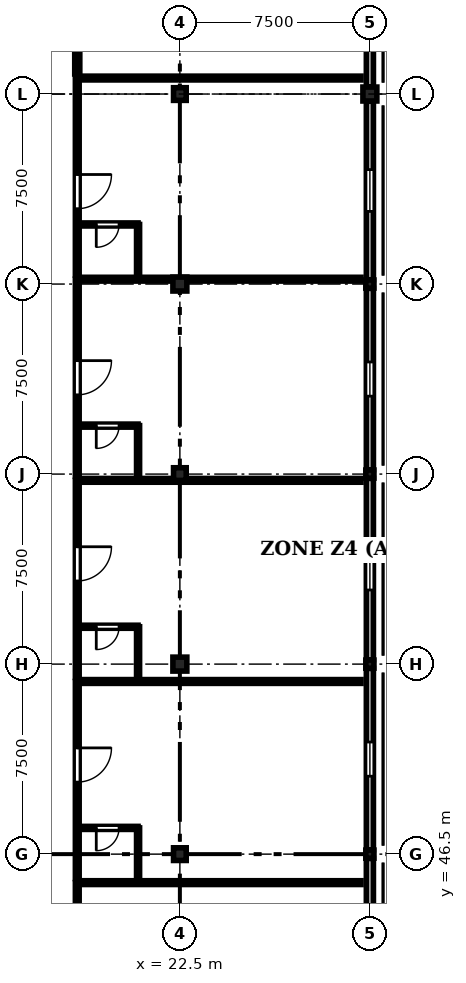
"""IFC4 building model, lengths in metres.
Left out: names, types, materials, properties, quantities, classifications, styles, units other than length and angle.
Written with IfcOpenShell. Run it as: python <this file> out.ifc"""

import sys

from ifc_helpers import new_model, si_unit, direction, frame, frame_2d, origin, origin_2d, place, context, subcontext, project, spatial, rectangle, extrude, element, fill, save


model = new_model("IFC4")
c1 = context("Model", 3, precision=1e-05, world=origin(), true_north=direction((0.0, 1.0)))
c2 = subcontext(c1, "Body", "Model", "MODEL_VIEW")
j1 = project(units=[si_unit("LENGTHUNIT", "METRE"), si_unit("PLANEANGLEUNIT", "RADIAN")], contexts=[c1])
p1 = place(None, origin())
s1 = spatial("IfcSite", under=j1, at=p1, CompositionType="ELEMENT")
p2 = place(p1, origin())
s2 = spatial("IfcBuilding", under=s1, at=p2, CompositionType="ELEMENT")
p3 = place(p2, frame((0.0, 0.0, 25.95)))
s3 = spatial("IfcBuildingStorey", under=s2, at=p3, CompositionType="ELEMENT", Elevation=25.95)
p4 = place(p3, frame((22.5, 46.5, 0.0), z_axis=(0.0, 0.0, 1.0), x_axis=(1.0, 0.0, 0.0)))
e1 = element("IfcColumn", 1, at=p4, inside=s3, PredefinedType="COLUMN", context=c2, shape_type="SweptSolid", body=[
    extrude(rectangle(XDim=0.5, YDim=0.5, at=origin_2d()), origin(), (0.0, 0.0, 1.0), 4.05),
])
p5 = place(p3, frame((22.5, 54.0, 0.0), z_axis=(0.0, 0.0, 1.0), x_axis=(1.0, 0.0, 0.0)))
e2 = element("IfcColumn", 2, at=p5, inside=s3, PredefinedType="COLUMN", context=c2, shape_type="SweptSolid", body=[
    extrude(rectangle(XDim=0.55, YDim=0.55, at=origin_2d()), origin(), (0.0, 0.0, 1.0), 4.05),
])
p6 = place(p3, frame((22.5, 61.5, 0.0), z_axis=(0.0, 0.0, 1.0), x_axis=(1.0, 0.0, 0.0)))
e3 = element("IfcColumn", 3, at=p6, inside=s3, PredefinedType="COLUMN", context=c2, shape_type="SweptSolid", body=[
    extrude(rectangle(XDim=0.5, YDim=0.5, at=origin_2d()), origin(), (0.0, 0.0, 1.0), 4.05),
])
p7 = place(p3, frame((22.5, 69.0, 0.0), z_axis=(0.0, 0.0, 1.0), x_axis=(1.0, 0.0, 0.0)))
e4 = element("IfcColumn", 4, at=p7, inside=s3, PredefinedType="COLUMN", context=c2, shape_type="SweptSolid", body=[
    extrude(rectangle(XDim=0.55, YDim=0.55, at=origin_2d()), origin(), (0.0, 0.0, 1.0), 4.05),
])
p8 = place(p3, frame((22.5, 76.5, 0.0), z_axis=(0.0, 0.0, 1.0), x_axis=(1.0, 0.0, 0.0)))
e5 = element("IfcColumn", 5, at=p8, inside=s3, PredefinedType="COLUMN", context=c2, shape_type="SweptSolid", body=[
    extrude(rectangle(XDim=0.5, YDim=0.5, at=origin_2d()), origin(), (0.0, 0.0, 1.0), 4.05),
])
for number, where, z_axis, x_axis in (
    (6, (30.0, 46.5, 0.0), (0.0, 0.0, 1.0), (1.0, 0.0, 0.0)),
    (7, (30.0, 54.0, 0.0), (0.0, 0.0, 1.0), (1.0, 0.0, 0.0)),
    (8, (30.0, 61.5, 0.0), (0.0, 0.0, 1.0), (1.0, 0.0, 0.0)),
    (9, (30.0, 69.0, 0.0), (0.0, 0.0, 1.0), (1.0, 0.0, 0.0)),
):
    element("IfcColumn", number, at=place(p3, frame(where, z_axis=z_axis, x_axis=x_axis)), inside=s3, PredefinedType="COLUMN", context=c2, shape_type="SweptSolid", body=[
        extrude(rectangle(XDim=0.32, YDim=0.32, at=origin_2d()), origin(), (0.0, 0.0, 1.0), 4.05),
    ])
p9 = place(p3, frame((30.0, 76.5, 0.0), z_axis=(0.0, 0.0, 1.0), x_axis=(1.0, 0.0, 0.0)))
e10 = element("IfcColumn", 10, at=p9, inside=s3, PredefinedType="COLUMN", context=c2, shape_type="SweptSolid", body=[
    extrude(rectangle(XDim=0.55, YDim=0.55, at=origin_2d()), origin(), (0.0, 0.0, 1.0), 4.05),
])
p10 = place(p3, frame((30.0, 46.33, 0.0), z_axis=(0.0, 0.0, 1.0), x_axis=(0.0, -1.0, 0.0)))
e11 = element("IfcWall", 11, at=p10, inside=s3, PredefinedType="STANDARD", context=c2, shape_type="SweptSolid", body=[
    extrude(rectangle(XDim=7.16, YDim=0.28, at=frame_2d((3.58, 0.0))), origin(), (0.0, 0.0, 1.0), 3.17),
])
p11 = place(p10, frame((2.755, 0.0, 0.85)))
e12 = element("IfcOpeningElement", 12, at=p11, cuts=e11, PredefinedType="OPENING", context=c2, shape_type="SweptSolid", body=[
    extrude(rectangle(XDim=1.65, YDim=2.04, at=frame_2d((0.825, 1.02))), frame((0.0, 0.15, 0.0), z_axis=(0.0, -1.0, 0.0), x_axis=(1.0, 0.0, 0.0)), (0.0, 0.0, 1.0), 0.3),
])
p12 = place(p3, frame((30.0, 53.83, 0.0), z_axis=(0.0, 0.0, 1.0), x_axis=(0.0, -1.0, 0.0)))
e13 = element("IfcWall", 13, at=p12, inside=s3, PredefinedType="STANDARD", context=c2, shape_type="SweptSolid", body=[
    extrude(rectangle(XDim=7.16, YDim=0.28, at=frame_2d((3.58, 0.0))), origin(), (0.0, 0.0, 1.0), 3.17),
])
p13 = place(p12, frame((2.905, 0.0, 0.85)))
e14 = element("IfcOpeningElement", 14, at=p13, cuts=e13, PredefinedType="OPENING", context=c2, shape_type="SweptSolid", body=[
    extrude(rectangle(XDim=1.35, YDim=2.04, at=frame_2d((0.675, 1.02))), frame((0.0, 0.15, 0.0), z_axis=(0.0, -1.0, 0.0), x_axis=(1.0, 0.0, 0.0)), (0.0, 0.0, 1.0), 0.3),
])
p14 = place(p3, frame((30.0, 61.33, 0.0), z_axis=(0.0, 0.0, 1.0), x_axis=(0.0, -1.0, 0.0)))
e15 = element("IfcWall", 15, at=p14, inside=s3, PredefinedType="STANDARD", context=c2, shape_type="SweptSolid", body=[
    extrude(rectangle(XDim=7.16, YDim=0.28, at=frame_2d((3.58, 0.0))), origin(), (0.0, 0.0, 1.0), 3.17),
])
p15 = place(p14, frame((2.755, 0.0, 0.85)))
e16 = element("IfcOpeningElement", 16, at=p15, cuts=e15, PredefinedType="OPENING", context=c2, shape_type="SweptSolid", body=[
    extrude(rectangle(XDim=1.65, YDim=2.04, at=frame_2d((0.825, 1.02))), frame((0.0, 0.15, 0.0), z_axis=(0.0, -1.0, 0.0), x_axis=(1.0, 0.0, 0.0)), (0.0, 0.0, 1.0), 0.3),
])
p16 = place(p3, frame((30.0, 68.83, 0.0), z_axis=(0.0, 0.0, 1.0), x_axis=(0.0, -1.0, 0.0)))
e17 = element("IfcWall", 17, at=p16, inside=s3, PredefinedType="STANDARD", context=c2, shape_type="SweptSolid", body=[
    extrude(rectangle(XDim=7.16, YDim=0.28, at=frame_2d((3.58, 0.0))), origin(), (0.0, 0.0, 1.0), 3.17),
])
p17 = place(p16, frame((2.905, 0.0, 0.85)))
e18 = element("IfcOpeningElement", 18, at=p17, cuts=e17, PredefinedType="OPENING", context=c2, shape_type="SweptSolid", body=[
    extrude(rectangle(XDim=1.35, YDim=2.04, at=frame_2d((0.675, 1.02))), frame((0.0, 0.15, 0.0), z_axis=(0.0, -1.0, 0.0), x_axis=(1.0, 0.0, 0.0)), (0.0, 0.0, 1.0), 0.3),
])
p18 = place(p3, frame((30.0, 76.215, 0.0), z_axis=(0.0, 0.0, 1.0), x_axis=(0.0, -1.0, 0.0)))
e19 = element("IfcWall", 19, at=p18, inside=s3, PredefinedType="STANDARD", context=c2, shape_type="SweptSolid", body=[
    extrude(rectangle(XDim=7.045, YDim=0.28, at=frame_2d((3.522, 0.0))), origin(), (0.0, 0.0, 1.0), 3.17),
])
p19 = place(p18, frame((2.698, 0.0, 0.85)))
e20 = element("IfcOpeningElement", 20, at=p19, cuts=e19, PredefinedType="OPENING", context=c2, shape_type="SweptSolid", body=[
    extrude(rectangle(XDim=1.65, YDim=2.04, at=frame_2d((0.825, 1.02))), frame((0.0, 0.15, 0.0), z_axis=(0.0, -1.0, 0.0), x_axis=(1.0, 0.0, 0.0)), (0.0, 0.0, 1.0), 0.3),
])
p20 = place(p3, frame((30.0, 85.265, 0.0), z_axis=(0.0, 0.0, 1.0), x_axis=(0.0, -1.0, 0.0)))
e21 = element("IfcWall", 21, at=p20, inside=s3, PredefinedType="STANDARD", context=c2, shape_type="SweptSolid", body=[
    extrude(rectangle(XDim=8.48, YDim=0.28, at=frame_2d((4.24, 0.0))), origin(), (0.0, 0.0, 1.0), 3.22),
])
p21 = place(p20, frame((3.565, 0.0, 0.85)))
e22 = element("IfcOpeningElement", 22, at=p21, cuts=e21, PredefinedType="OPENING", context=c2, shape_type="SweptSolid", body=[
    extrude(rectangle(XDim=1.35, YDim=2.09, at=frame_2d((0.675, 1.045))), frame((0.0, 0.15, 0.0), z_axis=(0.0, -1.0, 0.0), x_axis=(1.0, 0.0, 0.0)), (0.0, 0.0, 1.0), 0.3),
])
p22 = place(p3, frame((18.45, 45.375, 0.0), z_axis=(0.0, 0.0, 1.0), x_axis=(0.0, -1.0, 0.0)))
e23 = element("IfcWall", 23, at=p22, inside=s3, PredefinedType="PARTITIONING", context=c2, shape_type="SweptSolid", body=[
    extrude(rectangle(XDim=7.779, YDim=0.15, at=frame_2d((3.889, 0.0))), origin(), (0.0, 0.0, 1.0), 3.755),
])
p23 = place(p22, frame((2.029, 0.0, 0.0)))
e24 = element("IfcOpeningElement", 24, at=p23, cuts=e23, PredefinedType="OPENING", context=c2, shape_type="SweptSolid", body=[
    extrude(rectangle(XDim=1.35, YDim=2.25, at=frame_2d((0.675, 1.125))), frame((0.0, 0.085, 0.0), z_axis=(0.0, -1.0, 0.0), x_axis=(1.0, 0.0, 0.0)), (0.0, 0.0, 1.0), 0.17),
])
p24 = place(p3, frame((18.45, 53.314, 0.0), z_axis=(0.0, 0.0, 1.0), x_axis=(0.0, -1.0, 0.0)))
e25 = element("IfcWall", 25, at=p24, inside=s3, PredefinedType="PARTITIONING", context=c2, shape_type="SweptSolid", body=[
    extrude(rectangle(XDim=7.779, YDim=0.15, at=frame_2d((3.889, 0.0))), origin(), (0.0, 0.0, 1.0), 3.755),
])
p25 = place(p24, frame((2.622, 0.0, 0.0)))
e26 = element("IfcOpeningElement", 26, at=p25, cuts=e25, PredefinedType="OPENING", context=c2, shape_type="SweptSolid", body=[
    extrude(rectangle(XDim=1.35, YDim=2.25, at=frame_2d((0.675, 1.125))), frame((0.0, 0.085, 0.0), z_axis=(0.0, -1.0, 0.0), x_axis=(1.0, 0.0, 0.0)), (0.0, 0.0, 1.0), 0.17),
])
p26 = place(p3, frame((20.85, 47.536, 0.0), z_axis=(0.0, 0.0, 1.0), x_axis=(-1.0, 0.0, 0.0)))
e27 = element("IfcWall", 27, at=p26, inside=s3, PredefinedType="PARTITIONING", context=c2, shape_type="SweptSolid", body=[
    extrude(rectangle(XDim=2.4, YDim=0.12, at=frame_2d((1.2, 0.0))), origin(), (0.0, 0.0, 1.0), 3.755),
])
p27 = place(p26, frame((0.75, 0.0, 0.0)))
e28 = element("IfcOpeningElement", 28, at=p27, cuts=e27, PredefinedType="OPENING", context=c2, shape_type="SweptSolid", body=[
    extrude(rectangle(XDim=0.9, YDim=2.1, at=frame_2d((0.45, 1.05))), frame((0.0, 0.07, 0.0), z_axis=(0.0, -1.0, 0.0), x_axis=(1.0, 0.0, 0.0)), (0.0, 0.0, 1.0), 0.14),
])
p28 = place(p3, frame((20.85, 45.536, 0.0), z_axis=(0.0, 0.0, 1.0), x_axis=(0.0, 1.0, 0.0)))
e29 = element("IfcWall", 29, at=p28, inside=s3, PredefinedType="PARTITIONING", context=c2, shape_type="SweptSolid", body=[
    extrude(rectangle(XDim=2.0, YDim=0.12, at=frame_2d((1.0, 0.0))), origin(), (0.0, 0.0, 1.0), 3.755),
])
p29 = place(p3, frame((18.45, 61.253, 0.0), z_axis=(0.0, 0.0, 1.0), x_axis=(0.0, -1.0, 0.0)))
e30 = element("IfcWall", 30, at=p29, inside=s3, PredefinedType="PARTITIONING", context=c2, shape_type="SweptSolid", body=[
    extrude(rectangle(XDim=7.779, YDim=0.15, at=frame_2d((3.89, 0.0))), origin(), (0.0, 0.0, 1.0), 3.755),
])
p30 = place(p29, frame((2.622, 0.0, 0.0)))
e31 = element("IfcOpeningElement", 31, at=p30, cuts=e30, PredefinedType="OPENING", context=c2, shape_type="SweptSolid", body=[
    extrude(rectangle(XDim=1.35, YDim=2.25, at=frame_2d((0.675, 1.125))), frame((0.0, 0.085, 0.0), z_axis=(0.0, -1.0, 0.0), x_axis=(1.0, 0.0, 0.0)), (0.0, 0.0, 1.0), 0.17),
])
p31 = place(p3, frame((20.85, 55.474, 0.0), z_axis=(0.0, 0.0, 1.0), x_axis=(-1.0, 0.0, 0.0)))
e32 = element("IfcWall", 32, at=p31, inside=s3, PredefinedType="PARTITIONING", context=c2, shape_type="SweptSolid", body=[
    extrude(rectangle(XDim=2.4, YDim=0.12, at=frame_2d((1.2, 0.0))), origin(), (0.0, 0.0, 1.0), 3.755),
])
p32 = place(p31, frame((0.75, 0.0, 0.0)))
e33 = element("IfcOpeningElement", 33, at=p32, cuts=e32, PredefinedType="OPENING", context=c2, shape_type="SweptSolid", body=[
    extrude(rectangle(XDim=0.9, YDim=2.1, at=frame_2d((0.45, 1.05))), frame((0.0, 0.07, 0.0), z_axis=(0.0, -1.0, 0.0), x_axis=(1.0, 0.0, 0.0)), (0.0, 0.0, 1.0), 0.14),
])
p33 = place(p3, frame((20.85, 53.474, 0.0), z_axis=(0.0, 0.0, 1.0), x_axis=(0.0, 1.0, 0.0)))
e34 = element("IfcWall", 34, at=p33, inside=s3, PredefinedType="PARTITIONING", context=c2, shape_type="SweptSolid", body=[
    extrude(rectangle(XDim=2.0, YDim=0.12, at=frame_2d((1.0, 0.0))), origin(), (0.0, 0.0, 1.0), 3.755),
])
p34 = place(p3, frame((18.45, 69.192, 0.0), z_axis=(0.0, 0.0, 1.0), x_axis=(0.0, -1.0, 0.0)))
e35 = element("IfcWall", 35, at=p34, inside=s3, PredefinedType="PARTITIONING", context=c2, shape_type="SweptSolid", body=[
    extrude(rectangle(XDim=7.779, YDim=0.15, at=frame_2d((3.889, 0.0))), origin(), (0.0, 0.0, 1.0), 3.755),
])
p35 = place(p34, frame((3.215, 0.0, 0.0)))
e36 = element("IfcOpeningElement", 36, at=p35, cuts=e35, PredefinedType="OPENING", context=c2, shape_type="SweptSolid", body=[
    extrude(rectangle(XDim=1.35, YDim=2.25, at=frame_2d((0.675, 1.125))), frame((0.0, 0.085, 0.0), z_axis=(0.0, -1.0, 0.0), x_axis=(1.0, 0.0, 0.0)), (0.0, 0.0, 1.0), 0.17),
])
p36 = place(p3, frame((20.85, 63.413, 0.0), z_axis=(0.0, 0.0, 1.0), x_axis=(-1.0, 0.0, 0.0)))
e37 = element("IfcWall", 37, at=p36, inside=s3, PredefinedType="PARTITIONING", context=c2, shape_type="SweptSolid", body=[
    extrude(rectangle(XDim=2.4, YDim=0.12, at=frame_2d((1.2, 0.0))), origin(), (0.0, 0.0, 1.0), 3.755),
])
p37 = place(p36, frame((0.75, 0.0, 0.0)))
e38 = element("IfcOpeningElement", 38, at=p37, cuts=e37, PredefinedType="OPENING", context=c2, shape_type="SweptSolid", body=[
    extrude(rectangle(XDim=0.9, YDim=2.1, at=frame_2d((0.45, 1.05))), frame((0.0, 0.07, 0.0), z_axis=(0.0, -1.0, 0.0), x_axis=(1.0, 0.0, 0.0)), (0.0, 0.0, 1.0), 0.14),
])
p38 = place(p3, frame((20.85, 61.413, 0.0), z_axis=(0.0, 0.0, 1.0), x_axis=(0.0, 1.0, 0.0)))
e39 = element("IfcWall", 39, at=p38, inside=s3, PredefinedType="PARTITIONING", context=c2, shape_type="SweptSolid", body=[
    extrude(rectangle(XDim=2.0, YDim=0.12, at=frame_2d((1.0, 0.0))), origin(), (0.0, 0.0, 1.0), 3.755),
])
p39 = place(p3, frame((18.45, 77.131, 0.0), z_axis=(0.0, 0.0, 1.0), x_axis=(0.0, -1.0, 0.0)))
e40 = element("IfcWall", 40, at=p39, inside=s3, PredefinedType="PARTITIONING", context=c2, shape_type="SweptSolid", body=[
    extrude(rectangle(XDim=7.779, YDim=0.15, at=frame_2d((3.889, 0.0))), origin(), (0.0, 0.0, 1.0), 3.355),
])
p40 = place(p39, frame((3.807, 0.0, 0.0)))
e41 = element("IfcOpeningElement", 41, at=p40, cuts=e40, PredefinedType="OPENING", context=c2, shape_type="SweptSolid", body=[
    extrude(rectangle(XDim=1.35, YDim=2.25, at=frame_2d((0.675, 1.125))), frame((0.0, 0.085, 0.0), z_axis=(0.0, -1.0, 0.0), x_axis=(1.0, 0.0, 0.0)), (0.0, 0.0, 1.0), 0.17),
])
p41 = place(p3, frame((20.85, 71.352, 0.0), z_axis=(0.0, 0.0, 1.0), x_axis=(-1.0, 0.0, 0.0)))
e42 = element("IfcWall", 42, at=p41, inside=s3, PredefinedType="PARTITIONING", context=c2, shape_type="SweptSolid", body=[
    extrude(rectangle(XDim=2.4, YDim=0.12, at=frame_2d((1.2, 0.0))), origin(), (0.0, 0.0, 1.0), 3.755),
])
p42 = place(p41, frame((0.75, 0.0, 0.0)))
e43 = element("IfcOpeningElement", 43, at=p42, cuts=e42, PredefinedType="OPENING", context=c2, shape_type="SweptSolid", body=[
    extrude(rectangle(XDim=0.9, YDim=2.1, at=frame_2d((0.45, 1.05))), frame((0.0, 0.07, 0.0), z_axis=(0.0, -1.0, 0.0), x_axis=(1.0, 0.0, 0.0)), (0.0, 0.0, 1.0), 0.14),
])
p43 = place(p3, frame((20.85, 69.352, 0.0), z_axis=(0.0, 0.0, 1.0), x_axis=(0.0, 1.0, 0.0)))
e44 = element("IfcWall", 44, at=p43, inside=s3, PredefinedType="PARTITIONING", context=c2, shape_type="SweptSolid", body=[
    extrude(rectangle(XDim=2.0, YDim=0.12, at=frame_2d((1.0, 0.0))), origin(), (0.0, 0.0, 1.0), 3.755),
])
p44 = place(p3, frame((18.45, 83.9, 0.0), z_axis=(0.0, 0.0, 1.0), x_axis=(0.0, -1.0, 0.0)))
e45 = element("IfcWall", 45, at=p44, inside=s3, PredefinedType="STANDARD", context=c2, shape_type="SweptSolid", body=[
    extrude(rectangle(XDim=6.609, YDim=0.2, at=frame_2d((3.304, 0.0))), origin(), (0.0, 0.0, 1.0), 3.355),
])
p45 = place(p44, frame((2.314, 0.0, 0.0)))
e46 = element("IfcOpeningElement", 46, at=p45, cuts=e45, PredefinedType="OPENING", context=c2, shape_type="SweptSolid", body=[
    extrude(rectangle(XDim=0.95, YDim=2.15, at=frame_2d((0.475, 1.075))), frame((0.0, 0.11, 0.0), z_axis=(0.0, -1.0, 0.0), x_axis=(1.0, 0.0, 0.0)), (0.0, 0.0, 1.0), 0.22),
])
for number, where, z_axis, x_axis in (
    (47, (18.45, 45.375, 0.0), (0.0, 0.0, 1.0), (1.0, 0.0, 0.0)),
    (48, (18.45, 53.314, 0.0), (0.0, 0.0, 1.0), (1.0, 0.0, 0.0)),
):
    element("IfcWall", number, at=place(p3, frame(where, z_axis=z_axis, x_axis=x_axis)), inside=s3, PredefinedType="PARTITIONING", context=c2, shape_type="SweptSolid", body=[
        extrude(rectangle(XDim=11.2, YDim=0.15, at=frame_2d((5.6, 0.0))), origin(), (0.0, 0.0, 1.0), 3.755),
    ])
for number, where, z_axis, x_axis in (
    (49, (18.45, 61.253, 0.0), (0.0, 0.0, 1.0), (1.0, 0.0, 0.0)),
    (50, (18.45, 69.192, 0.0), (0.0, 0.0, 1.0), (1.0, 0.0, 0.0)),
):
    element("IfcWall", number, at=place(p3, frame(where, z_axis=z_axis, x_axis=x_axis)), inside=s3, PredefinedType="PARTITIONING", context=c2, shape_type="SweptSolid", body=[
        extrude(rectangle(XDim=11.2, YDim=0.15, at=frame_2d((5.6, 0.0))), origin(), (0.0, 0.0, 1.0), 3.155),
    ])
p46 = place(p3, frame((18.45, 77.131, 0.0), z_axis=(0.0, 0.0, 1.0), x_axis=(1.0, 0.0, 0.0)))
e51 = element("IfcWall", 51, at=p46, inside=s3, PredefinedType="PARTITIONING", context=c2, shape_type="SweptSolid", body=[
    extrude(rectangle(XDim=11.2, YDim=0.15, at=frame_2d((5.6, 0.0))), origin(), (0.0, 0.0, 1.0), 3.755),
])
p47 = place(p13, origin())
e52 = element("IfcWindow", 52, at=p47, inside=s3, PartitioningType="SINGLE_PANEL", PredefinedType="WINDOW", context=c2, shape_type="SweptSolid", body=[
    extrude(rectangle(XDim=1.35, YDim=2.04, at=frame_2d((0.675, 1.02))), frame((0.0, 0.03, 0.0), z_axis=(0.0, -1.0, 0.0), x_axis=(1.0, 0.0, 0.0)), (0.0, 0.0, 1.0), 0.06),
])
fill(e14, e52)
p48 = place(p15, origin())
e53 = element("IfcWindow", 53, at=p48, inside=s3, PartitioningType="SINGLE_PANEL", PredefinedType="WINDOW", context=c2, shape_type="SweptSolid", body=[
    extrude(rectangle(XDim=1.65, YDim=2.04, at=frame_2d((0.825, 1.02))), frame((0.0, 0.03, 0.0), z_axis=(0.0, -1.0, 0.0), x_axis=(1.0, 0.0, 0.0)), (0.0, 0.0, 1.0), 0.06),
])
fill(e16, e53)
p49 = place(p17, origin())
e54 = element("IfcWindow", 54, at=p49, inside=s3, PartitioningType="SINGLE_PANEL", PredefinedType="WINDOW", context=c2, shape_type="SweptSolid", body=[
    extrude(rectangle(XDim=1.35, YDim=2.04, at=frame_2d((0.675, 1.02))), frame((0.0, 0.03, 0.0), z_axis=(0.0, -1.0, 0.0), x_axis=(1.0, 0.0, 0.0)), (0.0, 0.0, 1.0), 0.06),
])
fill(e18, e54)
p50 = place(p19, origin())
e55 = element("IfcWindow", 55, at=p50, inside=s3, PartitioningType="SINGLE_PANEL", PredefinedType="WINDOW", context=c2, shape_type="SweptSolid", body=[
    extrude(rectangle(XDim=1.65, YDim=2.04, at=frame_2d((0.825, 1.02))), frame((0.0, 0.03, 0.0), z_axis=(0.0, -1.0, 0.0), x_axis=(1.0, 0.0, 0.0)), (0.0, 0.0, 1.0), 0.06),
])
fill(e20, e55)
p51 = place(p25, origin())
e56 = element("IfcDoor", 56, at=p51, inside=s3, OperationType="SINGLE_SWING_LEFT", PredefinedType="DOOR", context=c2, shape_type="SweptSolid", body=[
    extrude(rectangle(XDim=1.35, YDim=2.25, at=frame_2d((0.675, 1.125))), frame((0.0, 0.025, 0.0), z_axis=(0.0, -1.0, 0.0), x_axis=(1.0, 0.0, 0.0)), (0.0, 0.0, 1.0), 0.05),
])
fill(e26, e56)
p52 = place(p27, origin())
e57 = element("IfcDoor", 57, at=p52, inside=s3, OperationType="SINGLE_SWING_RIGHT", PredefinedType="DOOR", context=c2, shape_type="SweptSolid", body=[
    extrude(rectangle(XDim=0.9, YDim=2.1, at=frame_2d((0.45, 1.05))), frame((0.0, 0.025, 0.0), z_axis=(0.0, -1.0, 0.0), x_axis=(1.0, 0.0, 0.0)), (0.0, 0.0, 1.0), 0.05),
])
fill(e28, e57)
p53 = place(p30, origin())
e58 = element("IfcDoor", 58, at=p53, inside=s3, OperationType="SINGLE_SWING_LEFT", PredefinedType="DOOR", context=c2, shape_type="SweptSolid", body=[
    extrude(rectangle(XDim=1.35, YDim=2.25, at=frame_2d((0.675, 1.125))), frame((0.0, 0.025, 0.0), z_axis=(0.0, -1.0, 0.0), x_axis=(1.0, 0.0, 0.0)), (0.0, 0.0, 1.0), 0.05),
])
fill(e31, e58)
p54 = place(p32, origin())
e59 = element("IfcDoor", 59, at=p54, inside=s3, OperationType="SINGLE_SWING_RIGHT", PredefinedType="DOOR", context=c2, shape_type="SweptSolid", body=[
    extrude(rectangle(XDim=0.9, YDim=2.1, at=frame_2d((0.45, 1.05))), frame((0.0, 0.025, 0.0), z_axis=(0.0, -1.0, 0.0), x_axis=(1.0, 0.0, 0.0)), (0.0, 0.0, 1.0), 0.05),
])
fill(e33, e59)
p55 = place(p35, origin())
e60 = element("IfcDoor", 60, at=p55, inside=s3, OperationType="SINGLE_SWING_LEFT", PredefinedType="DOOR", context=c2, shape_type="SweptSolid", body=[
    extrude(rectangle(XDim=1.35, YDim=2.25, at=frame_2d((0.675, 1.125))), frame((0.0, 0.025, 0.0), z_axis=(0.0, -1.0, 0.0), x_axis=(1.0, 0.0, 0.0)), (0.0, 0.0, 1.0), 0.05),
])
fill(e36, e60)
p56 = place(p37, origin())
e61 = element("IfcDoor", 61, at=p56, inside=s3, OperationType="SINGLE_SWING_RIGHT", PredefinedType="DOOR", context=c2, shape_type="SweptSolid", body=[
    extrude(rectangle(XDim=0.9, YDim=2.1, at=frame_2d((0.45, 1.05))), frame((0.0, 0.025, 0.0), z_axis=(0.0, -1.0, 0.0), x_axis=(1.0, 0.0, 0.0)), (0.0, 0.0, 1.0), 0.05),
])
fill(e38, e61)
p57 = place(p40, origin())
e62 = element("IfcDoor", 62, at=p57, inside=s3, OperationType="SINGLE_SWING_LEFT", PredefinedType="DOOR", context=c2, shape_type="SweptSolid", body=[
    extrude(rectangle(XDim=1.35, YDim=2.25, at=frame_2d((0.675, 1.125))), frame((0.0, 0.025, 0.0), z_axis=(0.0, -1.0, 0.0), x_axis=(1.0, 0.0, 0.0)), (0.0, 0.0, 1.0), 0.05),
])
fill(e41, e62)
p58 = place(p42, origin())
e63 = element("IfcDoor", 63, at=p58, inside=s3, OperationType="SINGLE_SWING_RIGHT", PredefinedType="DOOR", context=c2, shape_type="SweptSolid", body=[
    extrude(rectangle(XDim=0.9, YDim=2.1, at=frame_2d((0.45, 1.05))), frame((0.0, 0.025, 0.0), z_axis=(0.0, -1.0, 0.0), x_axis=(1.0, 0.0, 0.0)), (0.0, 0.0, 1.0), 0.05),
])
fill(e43, e63)
save(model, sys.argv[1])
